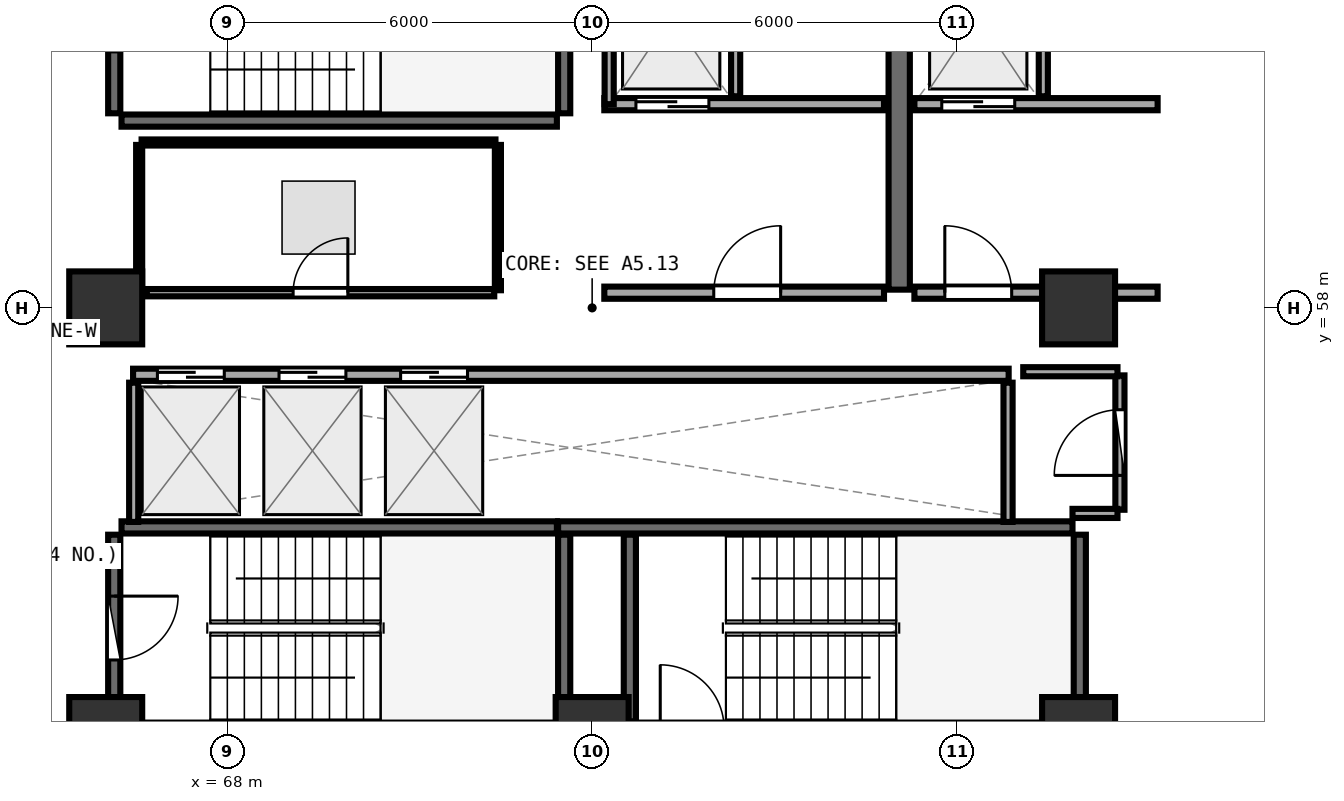
"""IFC4 building model, lengths in metres.
Left out: names, types, materials, properties, quantities, classifications, styles, units other than length and angle.
Written with IfcOpenShell. Run it as: python <this file> out.ifc"""

import sys

from ifc_helpers import new_model, si_unit, direction, frame, frame_2d, origin, origin_2d, place, context, subcontext, project, spatial, rectangle, extrude, element, fill, save


model = new_model("IFC4")
c1 = context("Model", 3, precision=1e-05, world=origin(), true_north=direction((0.0, 1.0)))
c2 = subcontext(c1, "Body", "Model", "MODEL_VIEW")
j1 = project(units=[si_unit("LENGTHUNIT", "METRE"), si_unit("PLANEANGLEUNIT", "RADIAN")], contexts=[c1])
p1 = place(None, origin())
s1 = spatial("IfcSite", under=j1, at=p1, CompositionType="ELEMENT")
p2 = place(p1, origin())
s2 = spatial("IfcBuilding", under=s1, at=p2, CompositionType="ELEMENT")
p3 = place(p2, frame((0.0, 0.0, 154.35)))
s3 = spatial("IfcBuildingStorey", under=s2, at=p3, CompositionType="ELEMENT", Elevation=154.35)
for number, where, z_axis, x_axis in (
    (1, (66.0, 51.0, 0.0), (0.0, 0.0, 1.0), (1.0, 0.0, 0.0)),
    (2, (74.0, 51.0, 0.0), (0.0, 0.0, 1.0), (1.0, 0.0, 0.0)),
    (3, (82.0, 51.0, 0.0), (0.0, 0.0, 1.0), (1.0, 0.0, 0.0)),
    (4, (82.0, 58.0, 0.0), (0.0, 0.0, 1.0), (1.0, 0.0, 0.0)),
    (5, (66.0, 58.0, 0.0), (0.0, 0.0, 1.0), (1.0, 0.0, 0.0)),
):
    element("IfcColumn", number, at=place(p3, frame(where, z_axis=z_axis, x_axis=x_axis)), inside=s3, PredefinedType="PILASTER", context=c2, shape_type="SweptSolid", body=[
        extrude(rectangle(XDim=1.2, YDim=1.2, at=origin_2d()), origin(), (0.0, 0.0, 1.0), 3.75),
    ])
p4 = place(p3, frame((66.26, 61.08, 0.0), z_axis=(0.0, 0.0, 1.0), x_axis=(1.0, 0.0, 0.0)))
e6 = element("IfcWall", 6, at=p4, inside=s3, PredefinedType="SHEAR", context=c2, shape_type="SweptSolid", body=[
    extrude(rectangle(XDim=7.16, YDim=0.2, at=frame_2d((3.58, 0.0))), origin(), (0.0, 0.0, 1.0), 3.49),
])
p5 = place(p3, frame((73.54, 61.2, 0.0), z_axis=(0.0, 0.0, 1.0), x_axis=(0.0, 1.0, 0.0)))
e7 = element("IfcWall", 7, at=p5, inside=s3, PredefinedType="SHEAR", context=c2, shape_type="SweptSolid", body=[
    extrude(rectangle(XDim=3.07, YDim=0.2, at=frame_2d((1.535, 0.0))), origin(), (0.0, 0.0, 1.0), 3.49),
])
p6 = place(p3, frame((66.14, 64.27, 0.0), z_axis=(0.0, 0.0, 1.0), x_axis=(0.0, -1.0, 0.0)))
e8 = element("IfcWall", 8, at=p6, inside=s3, PredefinedType="SHEAR", context=c2, shape_type="SweptSolid", body=[
    extrude(rectangle(XDim=3.07, YDim=0.2, at=frame_2d((1.535, 0.0))), origin(), (0.0, 0.0, 1.0), 3.49),
])
p7 = place(p6, frame((1.01, 0.0, 0.0)))
e9 = element("IfcOpeningElement", 9, at=p7, cuts=e8, PredefinedType="OPENING", context=c2, shape_type="SweptSolid", body=[
    extrude(rectangle(XDim=1.05, YDim=2.1, at=frame_2d((0.525, 1.05))), frame((0.0, 0.11, 0.0), z_axis=(0.0, -1.0, 0.0), x_axis=(1.0, 0.0, 0.0)), (0.0, 0.0, 1.0), 0.22),
])
p8 = place(p3, frame((82.02, 51.2, 0.0), z_axis=(0.0, 0.0, 1.0), x_axis=(0.0, 1.0, 0.0)))
e10 = element("IfcWall", 10, at=p8, inside=s3, PredefinedType="SHEAR", context=c2, shape_type="SweptSolid", body=[
    extrude(rectangle(XDim=3.07, YDim=0.2, at=frame_2d((1.535, 0.0))), origin(), (0.0, 0.0, 1.0), 3.49),
])
p9 = place(p3, frame((81.9, 54.39, 0.0), z_axis=(0.0, 0.0, 1.0), x_axis=(-1.0, 0.0, 0.0)))
e11 = element("IfcWall", 11, at=p9, inside=s3, PredefinedType="SHEAR", context=c2, shape_type="SweptSolid", body=[
    extrude(rectangle(XDim=8.46, YDim=0.2, at=frame_2d((4.23, 0.0))), origin(), (0.0, 0.0, 1.0), 3.49),
])
for number, where, z_axis, x_axis in (
    (12, (74.62, 54.27, 0.0), (0.0, 0.0, 1.0), (0.0, -1.0, 0.0)),
    (13, (73.54, 51.2, 0.0), (0.0, 0.0, 1.0), (0.0, 1.0, 0.0)),
):
    element("IfcWall", number, at=place(p3, frame(where, z_axis=z_axis, x_axis=x_axis)), inside=s3, PredefinedType="SHEAR", context=c2, shape_type="SweptSolid", body=[
        extrude(rectangle(XDim=3.07, YDim=0.2, at=frame_2d((1.535, 0.0))), origin(), (0.0, 0.0, 1.0), 3.49),
    ])
p10 = place(p3, frame((73.42, 54.39, 0.0), z_axis=(0.0, 0.0, 1.0), x_axis=(-1.0, 0.0, 0.0)))
e14 = element("IfcWall", 14, at=p10, inside=s3, PredefinedType="SHEAR", context=c2, shape_type="SweptSolid", body=[
    extrude(rectangle(XDim=7.16, YDim=0.2, at=frame_2d((3.58, 0.0))), origin(), (0.0, 0.0, 1.0), 3.49),
])
p11 = place(p3, frame((66.14, 54.27, 0.0), z_axis=(0.0, 0.0, 1.0), x_axis=(0.0, -1.0, 0.0)))
e15 = element("IfcWall", 15, at=p11, inside=s3, PredefinedType="SHEAR", context=c2, shape_type="SweptSolid", body=[
    extrude(rectangle(XDim=3.07, YDim=0.2, at=frame_2d((1.535, 0.0))), origin(), (0.0, 0.0, 1.0), 3.49),
])
p12 = place(p11, frame((1.01, 0.0, 0.0)))
e16 = element("IfcOpeningElement", 16, at=p12, cuts=e15, PredefinedType="OPENING", context=c2, shape_type="SweptSolid", body=[
    extrude(rectangle(XDim=1.05, YDim=2.1, at=frame_2d((0.525, 1.05))), frame((0.0, 0.11, 0.0), z_axis=(0.0, -1.0, 0.0), x_axis=(1.0, 0.0, 0.0)), (0.0, 0.0, 1.0), 0.22),
])
p13 = place(p3, frame((79.05, 58.3, 0.0), z_axis=(0.0, 0.0, 1.0), x_axis=(0.0, 1.0, 0.0)))
e17 = element("IfcWall", 17, at=p13, inside=s3, PredefinedType="SHEAR", context=c2, shape_type="SweptSolid", body=[
    extrude(rectangle(XDim=6.3, YDim=0.35, at=frame_2d((3.15, 0.0))), origin(), (0.0, 0.0, 1.0), 3.49),
])
p14 = place(p3, frame((74.2, 61.35, 0.0), z_axis=(0.0, 0.0, 1.0), x_axis=(1.0, 0.0, 0.0)))
e18 = element("IfcWall", 18, at=p14, inside=s3, PredefinedType="SOLIDWALL", context=c2, shape_type="SweptSolid", body=[
    extrude(rectangle(XDim=4.6, YDim=0.2, at=frame_2d((2.3, 0.0))), origin(), (0.0, 0.0, 1.0), 3.48),
])
p15 = place(p14, frame((0.52, 0.0, 0.0)))
e19 = element("IfcOpeningElement", 19, at=p15, cuts=e18, PredefinedType="OPENING", context=c2, shape_type="SweptSolid", body=[
    extrude(rectangle(XDim=1.2, YDim=2.15, at=frame_2d((0.6, 1.075))), frame((0.0, 0.11, 0.0), z_axis=(0.0, -1.0, 0.0), x_axis=(1.0, 0.0, 0.0)), (0.0, 0.0, 1.0), 0.22),
])
p16 = place(p3, frame((74.28, 61.35, 0.0), z_axis=(0.0, 0.0, 1.0), x_axis=(0.0, 1.0, 0.0)))
e20 = element("IfcWall", 20, at=p16, inside=s3, PredefinedType="PARTITIONING", context=c2, shape_type="SweptSolid", body=[
    extrude(rectangle(XDim=2.97, YDim=0.15, at=frame_2d((1.485, 0.0))), origin(), (0.0, 0.0, 1.0), 3.48),
])
p17 = place(p3, frame((76.36, 61.48, 0.0), z_axis=(0.0, 0.0, 1.0), x_axis=(0.0, 1.0, 0.0)))
e21 = element("IfcWall", 21, at=p17, inside=s3, PredefinedType="PARTITIONING", context=c2, shape_type="SweptSolid", body=[
    extrude(rectangle(XDim=2.84, YDim=0.15, at=frame_2d((1.42, 0.0))), origin(), (0.0, 0.0, 1.0), 3.48),
])
p18 = place(p3, frame((79.3, 61.35, 0.0), z_axis=(0.0, 0.0, 1.0), x_axis=(1.0, 0.0, 0.0)))
e22 = element("IfcWall", 22, at=p18, inside=s3, PredefinedType="SOLIDWALL", context=c2, shape_type="SweptSolid", body=[
    extrude(rectangle(XDim=4.0, YDim=0.2, at=frame_2d((2.0, 0.0))), origin(), (0.0, 0.0, 1.0), 2.775),
])
p19 = place(p18, frame((0.45, 0.0, 0.0)))
e23 = element("IfcOpeningElement", 23, at=p19, cuts=e22, PredefinedType="OPENING", context=c2, shape_type="SweptSolid", body=[
    extrude(rectangle(XDim=1.2, YDim=2.15, at=frame_2d((0.6, 1.075))), frame((0.0, 0.11, 0.0), z_axis=(0.0, -1.0, 0.0), x_axis=(1.0, 0.0, 0.0)), (0.0, 0.0, 1.0), 0.22),
])
p20 = place(p3, frame((81.42, 61.48, 0.0), z_axis=(0.0, 0.0, 1.0), x_axis=(0.0, 1.0, 0.0)))
e24 = element("IfcWall", 24, at=p20, inside=s3, PredefinedType="PARTITIONING", context=c2, shape_type="SweptSolid", body=[
    extrude(rectangle(XDim=2.84, YDim=0.15, at=frame_2d((1.42, 0.0))), origin(), (0.0, 0.0, 1.0), 3.48),
])
p21 = place(p3, frame((74.2, 58.25, 0.0), z_axis=(0.0, 0.0, 1.0), x_axis=(1.0, 0.0, 0.0)))
e25 = element("IfcWall", 25, at=p21, inside=s3, PredefinedType="SOLIDWALL", context=c2, shape_type="SweptSolid", body=[
    extrude(rectangle(XDim=4.6, YDim=0.2, at=frame_2d((2.3, 0.0))), origin(), (0.0, 0.0, 1.0), 3.48),
])
p22 = place(p21, frame((1.8, 0.0, 0.0)))
e26 = element("IfcOpeningElement", 26, at=p22, cuts=e25, PredefinedType="OPENING", context=c2, shape_type="SweptSolid", body=[
    extrude(rectangle(XDim=1.1, YDim=2.1, at=frame_2d((0.55, 1.05))), frame((0.0, 0.11, 0.0), z_axis=(0.0, -1.0, 0.0), x_axis=(1.0, 0.0, 0.0)), (0.0, 0.0, 1.0), 0.22),
])
p23 = place(p3, frame((79.3, 58.25, 0.0), z_axis=(0.0, 0.0, 1.0), x_axis=(1.0, 0.0, 0.0)))
e27 = element("IfcWall", 27, at=p23, inside=s3, PredefinedType="SOLIDWALL", context=c2, shape_type="SweptSolid", body=[
    extrude(rectangle(XDim=4.0, YDim=0.2, at=frame_2d((2.0, 0.0))), origin(), (0.0, 0.0, 1.0), 2.775),
])
p24 = place(p23, frame((0.5, 0.0, 0.0)))
e28 = element("IfcOpeningElement", 28, at=p24, cuts=e27, PredefinedType="OPENING", context=c2, shape_type="SweptSolid", body=[
    extrude(rectangle(XDim=1.1, YDim=2.1, at=frame_2d((0.55, 1.05))), frame((0.0, 0.11, 0.0), z_axis=(0.0, -1.0, 0.0), x_axis=(1.0, 0.0, 0.0)), (0.0, 0.0, 1.0), 0.22),
])
p25 = place(p3, frame((66.45, 56.9, 0.0), z_axis=(0.0, 0.0, 1.0), x_axis=(1.0, 0.0, 0.0)))
e29 = element("IfcWall", 29, at=p25, inside=s3, PredefinedType="SOLIDWALL", context=c2, shape_type="SweptSolid", body=[
    extrude(rectangle(XDim=14.4, YDim=0.2, at=frame_2d((7.2, 0.0))), origin(), (0.0, 0.0, 1.0), 3.48),
])
p26 = place(p25, frame((0.4, 0.0, 0.0)))
e30 = element("IfcOpeningElement", 30, at=p26, cuts=e29, PredefinedType="OPENING", context=c2, shape_type="SweptSolid", body=[
    extrude(rectangle(XDim=1.1, YDim=2.1, at=frame_2d((0.55, 1.05))), frame((0.0, 0.11, 0.0), z_axis=(0.0, -1.0, 0.0), x_axis=(1.0, 0.0, 0.0)), (0.0, 0.0, 1.0), 0.22),
])
p27 = place(p25, frame((2.4, 0.0, 0.0)))
e31 = element("IfcOpeningElement", 31, at=p27, cuts=e29, PredefinedType="OPENING", context=c2, shape_type="SweptSolid", body=[
    extrude(rectangle(XDim=1.1, YDim=2.1, at=frame_2d((0.55, 1.05))), frame((0.0, 0.11, 0.0), z_axis=(0.0, -1.0, 0.0), x_axis=(1.0, 0.0, 0.0)), (0.0, 0.0, 1.0), 0.22),
])
p28 = place(p25, frame((4.4, 0.0, 0.0)))
e32 = element("IfcOpeningElement", 32, at=p28, cuts=e29, PredefinedType="OPENING", context=c2, shape_type="SweptSolid", body=[
    extrude(rectangle(XDim=1.1, YDim=2.1, at=frame_2d((0.55, 1.05))), frame((0.0, 0.11, 0.0), z_axis=(0.0, -1.0, 0.0), x_axis=(1.0, 0.0, 0.0)), (0.0, 0.0, 1.0), 0.22),
])
for number, where, z_axis, x_axis in (
    (33, (66.46, 54.48, 0.0), (0.0, 0.0, 1.0), (0.0, 1.0, 0.0)),
    (34, (80.84, 54.48, 0.0), (0.0, 0.0, 1.0), (0.0, 1.0, 0.0)),
):
    element("IfcWall", number, at=place(p3, frame(where, z_axis=z_axis, x_axis=x_axis)), inside=s3, PredefinedType="PARTITIONING", context=c2, shape_type="SweptSolid", body=[
        extrude(rectangle(XDim=2.29, YDim=0.15, at=frame_2d((1.145, 0.0))), origin(), (0.0, 0.0, 1.0), 3.48),
    ])
p29 = place(p3, frame((82.68, 54.68, 0.0), z_axis=(0.0, 0.0, 1.0), x_axis=(0.0, 1.0, 0.0)))
e35 = element("IfcWall", 35, at=p29, inside=s3, PredefinedType="PARTITIONING", context=c2, shape_type="SweptSolid", body=[
    extrude(rectangle(XDim=2.21, YDim=0.15, at=frame_2d((1.105, 0.0))), origin(), (0.0, 0.0, 1.0), 3.48),
])
p30 = place(p29, frame((0.565, 0.0, 0.0)))
e36 = element("IfcOpeningElement", 36, at=p30, cuts=e35, PredefinedType="OPENING", context=c2, shape_type="SweptSolid", body=[
    extrude(rectangle(XDim=1.08, YDim=2.1, at=frame_2d((0.54, 1.05))), frame((0.0, 0.085, 0.0), z_axis=(0.0, -1.0, 0.0), x_axis=(1.0, 0.0, 0.0)), (0.0, 0.0, 1.0), 0.17),
])
p31 = place(p3, frame((66.675, 58.25, 0.0), z_axis=(0.0, 0.0, 1.0), x_axis=(1.0, 0.0, 0.0)))
e37 = element("IfcWall", 37, at=p31, inside=s3, PredefinedType="PARTITIONING", context=c2, shape_type="SweptSolid", body=[
    extrude(rectangle(XDim=5.715, YDim=0.12, at=frame_2d((2.857, 0.0))), origin(), (0.0, 0.0, 1.0), 3.48),
])
p32 = place(p31, frame((2.407, 0.0, 0.0)))
e38 = element("IfcOpeningElement", 38, at=p32, cuts=e37, PredefinedType="OPENING", context=c2, shape_type="SweptSolid", body=[
    extrude(rectangle(XDim=0.9, YDim=2.08, at=frame_2d((0.45, 1.04))), frame((0.0, 0.07, 0.0), z_axis=(0.0, -1.0, 0.0), x_axis=(1.0, 0.0, 0.0)), (0.0, 0.0, 1.0), 0.14),
])
p33 = place(p3, frame((81.9, 54.62, 0.0), z_axis=(0.0, 0.0, 1.0), x_axis=(1.0, 0.0, 0.0)))
e39 = element("IfcWall", 39, at=p33, inside=s3, PredefinedType="PARTITIONING", context=c2, shape_type="SweptSolid", body=[
    extrude(rectangle(XDim=0.74, YDim=0.15, at=frame_2d((0.37, 0.0))), origin(), (0.0, 0.0, 1.0), 2.775),
])
p34 = place(p3, frame((82.64, 56.95, 0.0), z_axis=(0.0, 0.0, 1.0), x_axis=(-1.0, 0.0, 0.0)))
e40 = element("IfcWall", 40, at=p34, inside=s3, PredefinedType="PARTITIONING", context=c2, shape_type="SweptSolid", body=[
    extrude(rectangle(XDim=1.55, YDim=0.15, at=frame_2d((0.775, 0.0))), origin(), (0.0, 0.0, 1.0), 2.775),
])
p35 = place(p3, frame((72.45, 58.29, 0.0), z_axis=(0.0, 0.0, 1.0), x_axis=(0.0, 1.0, 0.0)))
e41 = element("IfcWall", 41, at=p35, inside=s3, PredefinedType="PARTITIONING", context=c2, shape_type="SweptSolid", body=[
    extrude(rectangle(XDim=2.39, YDim=0.1, at=frame_2d((1.195, 0.0))), origin(), (0.0, 0.0, 1.0), 3.48),
])
p36 = place(p3, frame((72.41, 60.72, 0.0), z_axis=(0.0, 0.0, 1.0), x_axis=(-1.0, 0.0, 0.0)))
e42 = element("IfcWall", 42, at=p36, inside=s3, PredefinedType="PARTITIONING", context=c2, shape_type="SweptSolid", body=[
    extrude(rectangle(XDim=5.82, YDim=0.1, at=frame_2d((2.91, 0.0))), origin(), (0.0, 0.0, 1.0), 3.48),
])
p37 = place(p3, frame((66.55, 60.68, 0.0), z_axis=(0.0, 0.0, 1.0), x_axis=(0.0, -1.0, 0.0)))
e43 = element("IfcWall", 43, at=p37, inside=s3, PredefinedType="PARTITIONING", context=c2, shape_type="SweptSolid", body=[
    extrude(rectangle(XDim=2.383, YDim=0.1, at=frame_2d((1.191, 0.0))), origin(), (0.0, 0.0, 1.0), 3.48),
])
p38 = place(p3, frame((84.891, 50.352, 0.0), z_axis=(0.0, 0.0, 1.0), x_axis=(0.481680787808, 0.876346745676, 0.0)))
e44 = element("IfcWall", 44, at=p38, inside=s3, PredefinedType="PARTITIONING", context=c2, shape_type="SweptSolid", body=[
    extrude(rectangle(XDim=5.16, YDim=0.1, at=frame_2d((2.58, 0.0))), origin(), (0.0, 0.0, 1.0), 2.975),
])
p39 = place(p3, frame((87.032, 62.129, 0.0), z_axis=(0.0, 0.0, 1.0), x_axis=(-0.619933209612, 0.784654583636, 0.0)))
e45 = element("IfcWall", 45, at=p39, inside=s3, PredefinedType="PARTITIONING", context=c2, shape_type="SweptSolid", body=[
    extrude(rectangle(XDim=7.095, YDim=0.1, at=frame_2d((3.547, 0.0))), origin(), (0.0, 0.0, 1.0), 2.975),
])
p40 = place(p12, origin())
e46 = element("IfcDoor", 46, at=p40, inside=s3, OperationType="SINGLE_SWING_LEFT", PredefinedType="DOOR", context=c2, shape_type="SweptSolid", body=[
    extrude(rectangle(XDim=1.05, YDim=2.1, at=frame_2d((0.525, 1.05))), frame((0.0, 0.025, 0.0), z_axis=(0.0, -1.0, 0.0), x_axis=(1.0, 0.0, 0.0)), (0.0, 0.0, 1.0), 0.05),
])
fill(e16, e46)
p41 = place(p15, origin())
e47 = element("IfcDoor", 47, at=p41, inside=s3, OperationType="DOUBLE_DOOR_SLIDING", PredefinedType="DOOR", context=c2, shape_type="SweptSolid", body=[
    extrude(rectangle(XDim=1.2, YDim=2.15, at=frame_2d((0.6, 1.075))), frame((0.0, 0.025, 0.0), z_axis=(0.0, -1.0, 0.0), x_axis=(1.0, 0.0, 0.0)), (0.0, 0.0, 1.0), 0.05),
])
fill(e19, e47)
p42 = place(p19, origin())
e48 = element("IfcDoor", 48, at=p42, inside=s3, OperationType="DOUBLE_DOOR_SLIDING", PredefinedType="DOOR", context=c2, shape_type="SweptSolid", body=[
    extrude(rectangle(XDim=1.2, YDim=2.15, at=frame_2d((0.6, 1.075))), frame((0.0, 0.025, 0.0), z_axis=(0.0, -1.0, 0.0), x_axis=(1.0, 0.0, 0.0)), (0.0, 0.0, 1.0), 0.05),
])
fill(e23, e48)
p43 = place(p22, frame((1.1, 0.0, 0.0), z_axis=(0.0, 0.0, 1.0), x_axis=(-1.0, 0.0, 0.0)))
e49 = element("IfcDoor", 49, at=p43, inside=s3, OperationType="SINGLE_SWING_LEFT", PredefinedType="DOOR", context=c2, shape_type="SweptSolid", body=[
    extrude(rectangle(XDim=1.1, YDim=2.1, at=frame_2d((0.55, 1.05))), frame((0.0, 0.025, 0.0), z_axis=(0.0, -1.0, 0.0), x_axis=(1.0, 0.0, 0.0)), (0.0, 0.0, 1.0), 0.05),
])
fill(e26, e49)
p44 = place(p24, frame((1.1, 0.0, 0.0), z_axis=(0.0, 0.0, 1.0), x_axis=(-1.0, 0.0, 0.0)))
e50 = element("IfcDoor", 50, at=p44, inside=s3, OperationType="SINGLE_SWING_RIGHT", PredefinedType="DOOR", context=c2, shape_type="SweptSolid", body=[
    extrude(rectangle(XDim=1.1, YDim=2.1, at=frame_2d((0.55, 1.05))), frame((0.0, 0.025, 0.0), z_axis=(0.0, -1.0, 0.0), x_axis=(1.0, 0.0, 0.0)), (0.0, 0.0, 1.0), 0.05),
])
fill(e28, e50)
p45 = place(p26, origin())
e51 = element("IfcDoor", 51, at=p45, inside=s3, OperationType="DOUBLE_DOOR_SLIDING", PredefinedType="DOOR", context=c2, shape_type="SweptSolid", body=[
    extrude(rectangle(XDim=1.1, YDim=2.1, at=frame_2d((0.55, 1.05))), frame((0.0, 0.025, 0.0), z_axis=(0.0, -1.0, 0.0), x_axis=(1.0, 0.0, 0.0)), (0.0, 0.0, 1.0), 0.05),
])
fill(e30, e51)
p46 = place(p27, origin())
e52 = element("IfcDoor", 52, at=p46, inside=s3, OperationType="DOUBLE_DOOR_SLIDING", PredefinedType="DOOR", context=c2, shape_type="SweptSolid", body=[
    extrude(rectangle(XDim=1.1, YDim=2.1, at=frame_2d((0.55, 1.05))), frame((0.0, 0.025, 0.0), z_axis=(0.0, -1.0, 0.0), x_axis=(1.0, 0.0, 0.0)), (0.0, 0.0, 1.0), 0.05),
])
fill(e31, e52)
p47 = place(p28, origin())
e53 = element("IfcDoor", 53, at=p47, inside=s3, OperationType="DOUBLE_DOOR_SLIDING", PredefinedType="DOOR", context=c2, shape_type="SweptSolid", body=[
    extrude(rectangle(XDim=1.1, YDim=2.1, at=frame_2d((0.55, 1.05))), frame((0.0, 0.025, 0.0), z_axis=(0.0, -1.0, 0.0), x_axis=(1.0, 0.0, 0.0)), (0.0, 0.0, 1.0), 0.05),
])
fill(e32, e53)
p48 = place(p30, origin())
e54 = element("IfcDoor", 54, at=p48, inside=s3, OperationType="SINGLE_SWING_LEFT", PredefinedType="DOOR", context=c2, shape_type="SweptSolid", body=[
    extrude(rectangle(XDim=1.08, YDim=2.1, at=frame_2d((0.54, 1.05))), frame((0.0, 0.025, 0.0), z_axis=(0.0, -1.0, 0.0), x_axis=(1.0, 0.0, 0.0)), (0.0, 0.0, 1.0), 0.05),
])
fill(e36, e54)
p49 = place(p32, origin())
e55 = element("IfcDoor", 55, at=p49, inside=s3, OperationType="SINGLE_SWING_RIGHT", PredefinedType="DOOR", context=c2, shape_type="SweptSolid", body=[
    extrude(rectangle(XDim=0.9, YDim=2.08, at=frame_2d((0.45, 1.04))), frame((0.0, 0.025, 0.0), z_axis=(0.0, -1.0, 0.0), x_axis=(1.0, 0.0, 0.0)), (0.0, 0.0, 1.0), 0.05),
])
fill(e38, e55)
save(model, sys.argv[1])
